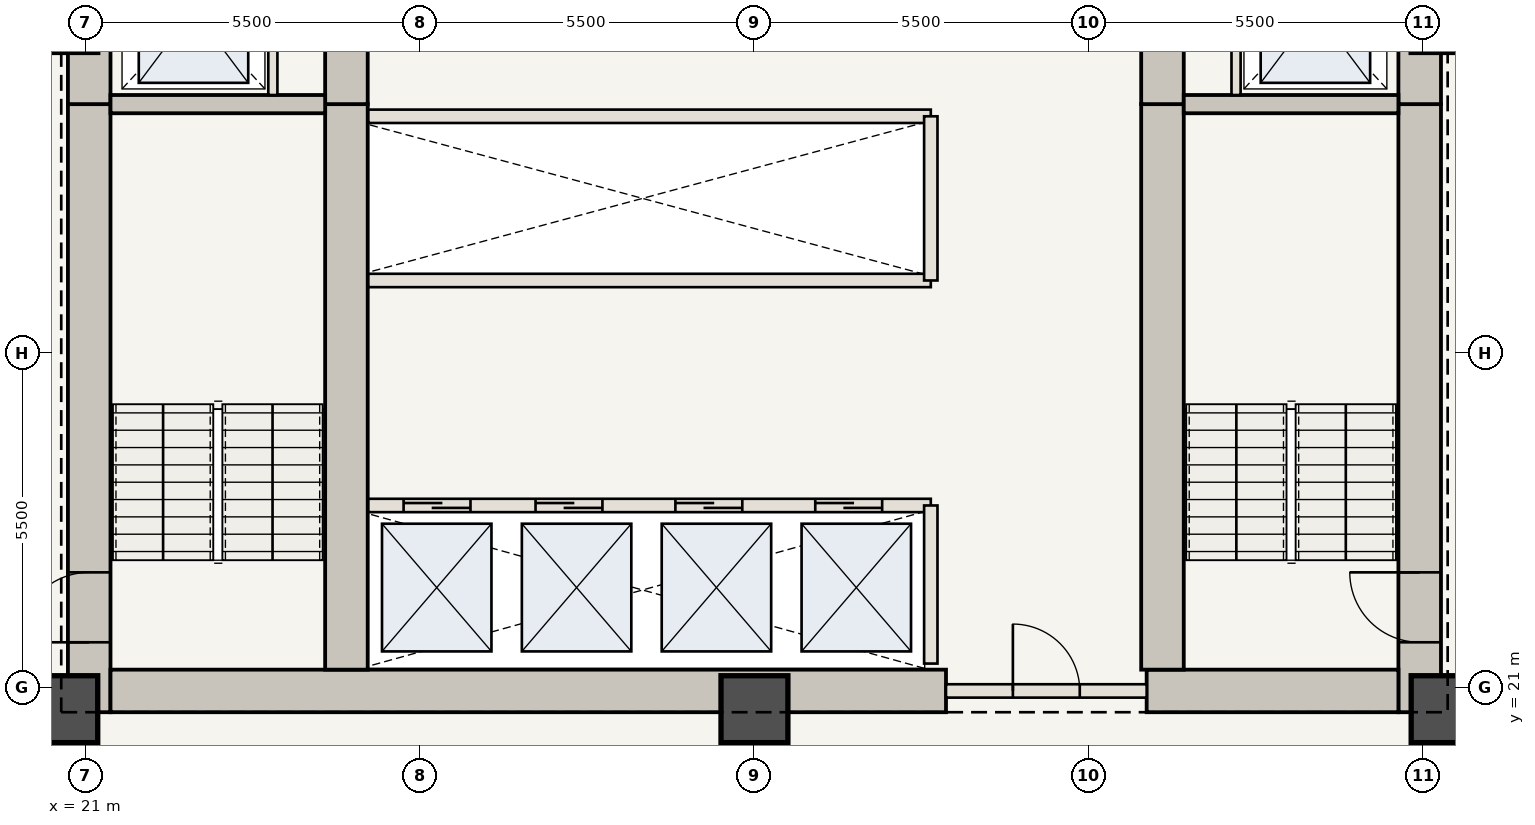
"""IFC4 building model, lengths in metres.
Left out: names, types, materials, properties, quantities, classifications, styles, units other than length and angle.
Written with IfcOpenShell. Run it as: python <this file> out.ifc"""

import sys

from ifc_helpers import new_model, si_unit, direction, frame, frame_2d, origin, origin_2d, place, context, subcontext, project, spatial, rectangle, extrude, element, fill, save


model = new_model("IFC4")
c1 = context("Model", 3, precision=1e-05, world=origin(), true_north=direction((0.0, 1.0)))
c2 = subcontext(c1, "Body", "Model", "MODEL_VIEW")
j1 = project(units=[si_unit("LENGTHUNIT", "METRE"), si_unit("PLANEANGLEUNIT", "RADIAN")], contexts=[c1])
p1 = place(None, origin())
s1 = spatial("IfcSite", under=j1, at=p1, CompositionType="ELEMENT")
p2 = place(p1, origin())
s2 = spatial("IfcBuilding", under=s1, at=p2, CompositionType="ELEMENT")
p3 = place(p2, frame((0.0, 0.0, 92.75)))
s3 = spatial("IfcBuildingStorey", under=s2, at=p3, CompositionType="ELEMENT", Elevation=92.75)
p4 = place(p3, frame((21.06, 20.6, 0.0), z_axis=(0.0, 0.0, 1.0), x_axis=(0.0, 1.0, 0.0)))
e1 = element("IfcWall", 1, at=p4, inside=s3, PredefinedType="SHEAR", context=c2, shape_type="SweptSolid", body=[
    extrude(rectangle(XDim=10.0, YDim=0.7, at=frame_2d((5.0, 0.0))), origin(), (0.0, 0.0, 1.0), 3.5),
])
p5 = place(p4, frame((1.15, 0.0, 0.0)))
e2 = element("IfcOpeningElement", 2, at=p5, cuts=e1, PredefinedType="OPENING", context=c2, shape_type="SweptSolid", body=[
    extrude(rectangle(XDim=1.15, YDim=2.15, at=frame_2d((0.575, 1.075))), frame((0.0, 0.36, 0.0), z_axis=(0.0, -1.0, 0.0), x_axis=(1.0, 0.0, 0.0)), (0.0, 0.0, 1.0), 0.72),
])
p6 = place(p3, frame((21.06, 30.6, 0.0), z_axis=(0.0, 0.0, 1.0), x_axis=(0.0, 1.0, 0.0)))
e3 = element("IfcWall", 3, at=p6, inside=s3, PredefinedType="SHEAR", context=c2, shape_type="SweptSolid", body=[
    extrude(rectangle(XDim=12.75, YDim=0.7, at=frame_2d((6.375, 0.0))), origin(), (0.0, 0.0, 1.0), 3.5),
])
p7 = place(p6, frame((4.2, 0.0, 0.0)))
e4 = element("IfcOpeningElement", 4, at=p7, cuts=e3, PredefinedType="OPENING", context=c2, shape_type="SweptSolid", body=[
    extrude(rectangle(XDim=1.1, YDim=2.15, at=frame_2d((0.55, 1.075))), frame((0.0, 0.36, 0.0), z_axis=(0.0, -1.0, 0.0), x_axis=(1.0, 0.0, 0.0)), (0.0, 0.0, 1.0), 0.72),
])
p8 = place(p6, frame((8.05, 0.0, 0.0)))
e5 = element("IfcOpeningElement", 5, at=p8, cuts=e3, PredefinedType="OPENING", context=c2, shape_type="SweptSolid", body=[
    extrude(rectangle(XDim=0.92, YDim=2.1, at=frame_2d((0.46, 1.05))), frame((0.0, 0.36, 0.0), z_axis=(0.0, -1.0, 0.0), x_axis=(1.0, 0.0, 0.0)), (0.0, 0.0, 1.0), 0.72),
])
p9 = place(p6, frame((9.45, 0.0, 0.0)))
e6 = element("IfcOpeningElement", 6, at=p9, cuts=e3, PredefinedType="OPENING", context=c2, shape_type="SweptSolid", body=[
    extrude(rectangle(XDim=0.88, YDim=2.1, at=frame_2d((0.44, 1.05))), frame((0.0, 0.36, 0.0), z_axis=(0.0, -1.0, 0.0), x_axis=(1.0, 0.0, 0.0)), (0.0, 0.0, 1.0), 0.72),
])
p10 = place(p6, frame((10.85, 0.0, 0.0)))
e7 = element("IfcOpeningElement", 7, at=p10, cuts=e3, PredefinedType="OPENING", context=c2, shape_type="SweptSolid", body=[
    extrude(rectangle(XDim=0.88, YDim=2.1, at=frame_2d((0.44, 1.05))), frame((0.0, 0.36, 0.0), z_axis=(0.0, -1.0, 0.0), x_axis=(1.0, 0.0, 0.0)), (0.0, 0.0, 1.0), 0.72),
])
p11 = place(p3, frame((42.94, 20.6, 0.0), z_axis=(0.0, 0.0, 1.0), x_axis=(0.0, 1.0, 0.0)))
e8 = element("IfcWall", 8, at=p11, inside=s3, PredefinedType="SHEAR", context=c2, shape_type="SweptSolid", body=[
    extrude(rectangle(XDim=10.0, YDim=0.7, at=frame_2d((5.0, 0.0))), origin(), (0.0, 0.0, 1.0), 3.5),
])
p12 = place(p11, frame((1.15, 0.0, 0.0)))
e9 = element("IfcOpeningElement", 9, at=p12, cuts=e8, PredefinedType="OPENING", context=c2, shape_type="SweptSolid", body=[
    extrude(rectangle(XDim=1.15, YDim=2.15, at=frame_2d((0.575, 1.075))), frame((0.0, 0.36, 0.0), z_axis=(0.0, -1.0, 0.0), x_axis=(1.0, 0.0, 0.0)), (0.0, 0.0, 1.0), 0.72),
])
p13 = place(p3, frame((42.94, 30.6, 0.0), z_axis=(0.0, 0.0, 1.0), x_axis=(0.0, 1.0, 0.0)))
e10 = element("IfcWall", 10, at=p13, inside=s3, PredefinedType="SHEAR", context=c2, shape_type="SweptSolid", body=[
    extrude(rectangle(XDim=12.75, YDim=0.7, at=frame_2d((6.375, 0.0))), origin(), (0.0, 0.0, 1.0), 3.5),
])
p14 = place(p13, frame((4.2, 0.0, 0.0)))
e11 = element("IfcOpeningElement", 11, at=p14, cuts=e10, PredefinedType="OPENING", context=c2, shape_type="SweptSolid", body=[
    extrude(rectangle(XDim=1.1, YDim=2.15, at=frame_2d((0.55, 1.075))), frame((0.0, 0.36, 0.0), z_axis=(0.0, -1.0, 0.0), x_axis=(1.0, 0.0, 0.0)), (0.0, 0.0, 1.0), 0.72),
])
p15 = place(p13, frame((9.2, 0.0, 0.0)))
e12 = element("IfcOpeningElement", 12, at=p15, cuts=e10, PredefinedType="OPENING", context=c2, shape_type="SweptSolid", body=[
    extrude(rectangle(XDim=0.92, YDim=2.1, at=frame_2d((0.46, 1.05))), frame((0.0, 0.36, 0.0), z_axis=(0.0, -1.0, 0.0), x_axis=(1.0, 0.0, 0.0)), (0.0, 0.0, 1.0), 0.72),
])
p16 = place(p3, frame((21.41, 20.95, 0.0), z_axis=(0.0, 0.0, 1.0), x_axis=(1.0, 0.0, 0.0)))
e13 = element("IfcWall", 13, at=p16, inside=s3, PredefinedType="SHEAR", context=c2, shape_type="SweptSolid", body=[
    extrude(rectangle(XDim=13.74, YDim=0.7, at=frame_2d((6.87, 0.0))), origin(), (0.0, 0.0, 1.0), 3.5),
])
p17 = place(p3, frame((38.45, 20.95, 0.0), z_axis=(0.0, 0.0, 1.0), x_axis=(1.0, 0.0, 0.0)))
e14 = element("IfcWall", 14, at=p17, inside=s3, PredefinedType="SHEAR", context=c2, shape_type="SweptSolid", body=[
    extrude(rectangle(XDim=4.14, YDim=0.7, at=frame_2d((2.07, 0.0))), origin(), (0.0, 0.0, 1.0), 3.5),
])
p18 = place(p3, frame((25.29, 21.3, 0.0), z_axis=(0.0, 0.0, 1.0), x_axis=(0.0, 1.0, 0.0)))
e15 = element("IfcWall", 15, at=p18, inside=s3, PredefinedType="SHEAR", context=c2, shape_type="SweptSolid", body=[
    extrude(rectangle(XDim=9.3, YDim=0.7, at=frame_2d((4.65, 0.0))), origin(), (0.0, 0.0, 1.0), 3.5),
])
p19 = place(p3, frame((25.29, 30.6, 0.0), z_axis=(0.0, 0.0, 1.0), x_axis=(0.0, 1.0, 0.0)))
e16 = element("IfcWall", 16, at=p19, inside=s3, PredefinedType="SHEAR", context=c2, shape_type="SweptSolid", body=[
    extrude(rectangle(XDim=12.05, YDim=0.7, at=frame_2d((6.025, 0.0))), origin(), (0.0, 0.0, 1.0), 3.5),
])
p20 = place(p19, frame((6.25, 0.0, 0.0)))
e17 = element("IfcOpeningElement", 17, at=p20, cuts=e16, PredefinedType="OPENING", context=c2, shape_type="SweptSolid", body=[
    extrude(rectangle(XDim=1.1, YDim=2.15, at=frame_2d((0.55, 1.075))), frame((0.0, 0.36, 0.0), z_axis=(0.0, -1.0, 0.0), x_axis=(1.0, 0.0, 0.0)), (0.0, 0.0, 1.0), 0.72),
])
p21 = place(p3, frame((38.71, 21.3, 0.0), z_axis=(0.0, 0.0, 1.0), x_axis=(0.0, 1.0, 0.0)))
e18 = element("IfcWall", 18, at=p21, inside=s3, PredefinedType="SHEAR", context=c2, shape_type="SweptSolid", body=[
    extrude(rectangle(XDim=9.3, YDim=0.7, at=frame_2d((4.65, 0.0))), origin(), (0.0, 0.0, 1.0), 3.5),
])
p22 = place(p3, frame((38.71, 30.6, 0.0), z_axis=(0.0, 0.0, 1.0), x_axis=(0.0, 1.0, 0.0)))
e19 = element("IfcWall", 19, at=p22, inside=s3, PredefinedType="SHEAR", context=c2, shape_type="SweptSolid", body=[
    extrude(rectangle(XDim=12.05, YDim=0.7, at=frame_2d((6.025, 0.0))), origin(), (0.0, 0.0, 1.0), 3.5),
])
for number, where, z_axis, x_axis in (
    (20, (20.65, 20.65, 0.0), (0.0, 0.0, 1.0), (1.0, 0.0, 0.0)),
    (21, (32.0, 20.65, 0.0), (0.0, 0.0, 1.0), (1.0, 0.0, 0.0)),
    (22, (43.35, 20.65, 0.0), (0.0, 0.0, 1.0), (1.0, 0.0, 0.0)),
):
    element("IfcColumn", number, at=place(p3, frame(where, z_axis=z_axis, x_axis=x_axis)), inside=s3, PredefinedType="COLUMN", context=c2, shape_type="SweptSolid", body=[
        extrude(rectangle(XDim=1.1, YDim=1.1, at=origin_2d()), origin(), (0.0, 0.0, 1.0), 3.5),
    ])
for number, where, z_axis, x_axis in (
    (23, (21.41, 30.6, 0.0), (0.0, 0.0, 1.0), (1.0, 0.0, 0.0)),
    (24, (39.06, 30.6, 0.0), (0.0, 0.0, 1.0), (1.0, 0.0, 0.0)),
):
    element("IfcWall", number, at=place(p3, frame(where, z_axis=z_axis, x_axis=x_axis)), inside=s3, PredefinedType="SHEAR", context=c2, shape_type="SweptSolid", body=[
        extrude(rectangle(XDim=3.53, YDim=0.3, at=frame_2d((1.765, 0.0))), origin(), (0.0, 0.0, 1.0), 3.28),
    ])
for number, where, z_axis, x_axis in (
    (25, (24.08, 30.75, 0.0), (0.0, 0.0, 1.0), (0.0, 1.0, 0.0)),
    (26, (39.92, 30.75, 0.0), (0.0, 0.0, 1.0), (0.0, 1.0, 0.0)),
):
    element("IfcWall", number, at=place(p3, frame(where, z_axis=z_axis, x_axis=x_axis)), inside=s3, PredefinedType="STANDARD", context=c2, shape_type="SweptSolid", body=[
        extrude(rectangle(XDim=2.65, YDim=0.15, at=frame_2d((1.325, 0.0))), origin(), (0.0, 0.0, 1.0), 3.28),
    ])
p23 = place(p3, frame((35.15, 20.95, 0.0), z_axis=(0.0, 0.0, 1.0), x_axis=(1.0, 0.0, 0.0)))
e27 = element("IfcWall", 27, at=p23, inside=s3, PredefinedType="STANDARD", context=c2, shape_type="SweptSolid", body=[
    extrude(rectangle(XDim=3.3, YDim=0.22, at=frame_2d((1.65, 0.0))), origin(), (0.0, 0.0, 1.0), 3.28),
])
p24 = place(p23, frame((1.1, 0.0, 0.0)))
e28 = element("IfcOpeningElement", 28, at=p24, cuts=e27, PredefinedType="OPENING", context=c2, shape_type="SweptSolid", body=[
    extrude(rectangle(XDim=1.1, YDim=2.15, at=frame_2d((0.55, 1.075))), frame((0.0, 0.12, 0.0), z_axis=(0.0, -1.0, 0.0), x_axis=(1.0, 0.0, 0.0)), (0.0, 0.0, 1.0), 0.24),
])
p25 = place(p3, frame((25.65, 24.0, 0.0), z_axis=(0.0, 0.0, 1.0), x_axis=(1.0, 0.0, 0.0)))
e29 = element("IfcWall", 29, at=p25, inside=s3, PredefinedType="STANDARD", context=c2, shape_type="SweptSolid", body=[
    extrude(rectangle(XDim=9.25, YDim=0.22, at=frame_2d((4.625, 0.0))), origin(), (0.0, 0.0, 1.0), 3.28),
])
p26 = place(p25, frame((0.58, 0.0, 0.0)))
e30 = element("IfcOpeningElement", 30, at=p26, cuts=e29, PredefinedType="OPENING", context=c2, shape_type="SweptSolid", body=[
    extrude(rectangle(XDim=1.1, YDim=2.15, at=frame_2d((0.55, 1.075))), frame((0.0, 0.12, 0.0), z_axis=(0.0, -1.0, 0.0), x_axis=(1.0, 0.0, 0.0)), (0.0, 0.0, 1.0), 0.24),
])
p27 = place(p25, frame((2.75, 0.0, 0.0)))
e31 = element("IfcOpeningElement", 31, at=p27, cuts=e29, PredefinedType="OPENING", context=c2, shape_type="SweptSolid", body=[
    extrude(rectangle(XDim=1.1, YDim=2.15, at=frame_2d((0.55, 1.075))), frame((0.0, 0.12, 0.0), z_axis=(0.0, -1.0, 0.0), x_axis=(1.0, 0.0, 0.0)), (0.0, 0.0, 1.0), 0.24),
])
p28 = place(p25, frame((5.05, 0.0, 0.0)))
e32 = element("IfcOpeningElement", 32, at=p28, cuts=e29, PredefinedType="OPENING", context=c2, shape_type="SweptSolid", body=[
    extrude(rectangle(XDim=1.1, YDim=2.15, at=frame_2d((0.55, 1.075))), frame((0.0, 0.12, 0.0), z_axis=(0.0, -1.0, 0.0), x_axis=(1.0, 0.0, 0.0)), (0.0, 0.0, 1.0), 0.24),
])
p29 = place(p25, frame((7.35, 0.0, 0.0)))
e33 = element("IfcOpeningElement", 33, at=p29, cuts=e29, PredefinedType="OPENING", context=c2, shape_type="SweptSolid", body=[
    extrude(rectangle(XDim=1.1, YDim=2.15, at=frame_2d((0.55, 1.075))), frame((0.0, 0.12, 0.0), z_axis=(0.0, -1.0, 0.0), x_axis=(1.0, 0.0, 0.0)), (0.0, 0.0, 1.0), 0.24),
])
p30 = place(p3, frame((34.9, 21.4, 0.0), z_axis=(0.0, 0.0, 1.0), x_axis=(0.0, 1.0, 0.0)))
e34 = element("IfcWall", 34, at=p30, inside=s3, PredefinedType="STANDARD", context=c2, shape_type="SweptSolid", body=[
    extrude(rectangle(XDim=2.6, YDim=0.22, at=frame_2d((1.3, 0.0))), origin(), (0.0, 0.0, 1.0), 3.28),
])
for number, where, z_axis, x_axis in (
    (35, (25.65, 27.7, 0.0), (0.0, 0.0, 1.0), (1.0, 0.0, 0.0)),
    (36, (25.65, 30.4, 0.0), (0.0, 0.0, 1.0), (1.0, 0.0, 0.0)),
):
    element("IfcWall", number, at=place(p3, frame(where, z_axis=z_axis, x_axis=x_axis)), inside=s3, PredefinedType="STANDARD", context=c2, shape_type="SweptSolid", body=[
        extrude(rectangle(XDim=9.25, YDim=0.22, at=frame_2d((4.625, 0.0))), origin(), (0.0, 0.0, 1.0), 3.28),
    ])
p31 = place(p3, frame((34.9, 27.7, 0.0), z_axis=(0.0, 0.0, 1.0), x_axis=(0.0, 1.0, 0.0)))
e37 = element("IfcWall", 37, at=p31, inside=s3, PredefinedType="STANDARD", context=c2, shape_type="SweptSolid", body=[
    extrude(rectangle(XDim=2.7, YDim=0.22, at=frame_2d((1.35, 0.0))), origin(), (0.0, 0.0, 1.0), 3.28),
])
p32 = place(p5, origin())
e38 = element("IfcDoor", 38, at=p32, inside=s3, OperationType="SINGLE_SWING_LEFT", PredefinedType="DOOR", context=c2, shape_type="SweptSolid", body=[
    extrude(rectangle(XDim=1.15, YDim=2.15, at=frame_2d((0.575, 1.075))), frame((0.0, 0.025, 0.0), z_axis=(0.0, -1.0, 0.0), x_axis=(1.0, 0.0, 0.0)), (0.0, 0.0, 1.0), 0.05),
])
fill(e2, e38)
p33 = place(p12, origin())
e39 = element("IfcDoor", 39, at=p33, inside=s3, OperationType="SINGLE_SWING_RIGHT", PredefinedType="DOOR", context=c2, shape_type="SweptSolid", body=[
    extrude(rectangle(XDim=1.15, YDim=2.15, at=frame_2d((0.575, 1.075))), frame((0.0, 0.025, 0.0), z_axis=(0.0, -1.0, 0.0), x_axis=(1.0, 0.0, 0.0)), (0.0, 0.0, 1.0), 0.05),
])
fill(e9, e39)
p34 = place(p24, origin())
e40 = element("IfcDoor", 40, at=p34, inside=s3, OperationType="SINGLE_SWING_LEFT", PredefinedType="DOOR", context=c2, shape_type="SweptSolid", body=[
    extrude(rectangle(XDim=1.1, YDim=2.15, at=frame_2d((0.55, 1.075))), frame((0.0, 0.025, 0.0), z_axis=(0.0, -1.0, 0.0), x_axis=(1.0, 0.0, 0.0)), (0.0, 0.0, 1.0), 0.05),
])
fill(e28, e40)
p35 = place(p26, origin())
e41 = element("IfcDoor", 41, at=p35, inside=s3, OperationType="DOUBLE_DOOR_SLIDING", PredefinedType="DOOR", context=c2, shape_type="SweptSolid", body=[
    extrude(rectangle(XDim=1.1, YDim=2.15, at=frame_2d((0.55, 1.075))), frame((0.0, 0.025, 0.0), z_axis=(0.0, -1.0, 0.0), x_axis=(1.0, 0.0, 0.0)), (0.0, 0.0, 1.0), 0.05),
])
fill(e30, e41)
p36 = place(p27, origin())
e42 = element("IfcDoor", 42, at=p36, inside=s3, OperationType="DOUBLE_DOOR_SLIDING", PredefinedType="DOOR", context=c2, shape_type="SweptSolid", body=[
    extrude(rectangle(XDim=1.1, YDim=2.15, at=frame_2d((0.55, 1.075))), frame((0.0, 0.025, 0.0), z_axis=(0.0, -1.0, 0.0), x_axis=(1.0, 0.0, 0.0)), (0.0, 0.0, 1.0), 0.05),
])
fill(e31, e42)
p37 = place(p28, origin())
e43 = element("IfcDoor", 43, at=p37, inside=s3, OperationType="DOUBLE_DOOR_SLIDING", PredefinedType="DOOR", context=c2, shape_type="SweptSolid", body=[
    extrude(rectangle(XDim=1.1, YDim=2.15, at=frame_2d((0.55, 1.075))), frame((0.0, 0.025, 0.0), z_axis=(0.0, -1.0, 0.0), x_axis=(1.0, 0.0, 0.0)), (0.0, 0.0, 1.0), 0.05),
])
fill(e32, e43)
p38 = place(p29, origin())
e44 = element("IfcDoor", 44, at=p38, inside=s3, OperationType="DOUBLE_DOOR_SLIDING", PredefinedType="DOOR", context=c2, shape_type="SweptSolid", body=[
    extrude(rectangle(XDim=1.1, YDim=2.15, at=frame_2d((0.55, 1.075))), frame((0.0, 0.025, 0.0), z_axis=(0.0, -1.0, 0.0), x_axis=(1.0, 0.0, 0.0)), (0.0, 0.0, 1.0), 0.05),
])
fill(e33, e44)
save(model, sys.argv[1])
